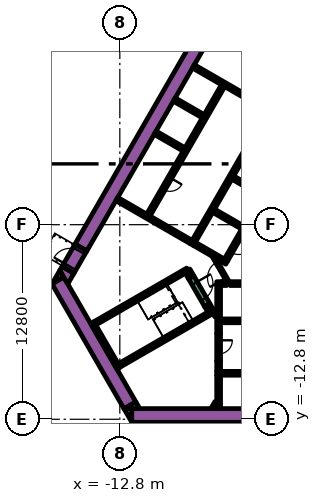
"""IFC4 building model, lengths in metres.
Left out: names, types, materials, properties, quantities, classifications, styles, units other than length and angle.
Written with IfcOpenShell. Run it as: python <this file> out.ifc"""

import sys

from ifc_helpers import new_model, si_unit, direction, frame, frame_2d, origin, origin_2d, place, context, subcontext, project, spatial, polyline, rectangle, outline, extrude, element, fill, save


model = new_model("IFC4")
c1 = context("Model", 3, precision=1e-05, world=origin(), true_north=direction((0.0, 1.0)))
c2 = subcontext(c1, "Body", "Model", "MODEL_VIEW")
j1 = project(units=[si_unit("LENGTHUNIT", "METRE"), si_unit("PLANEANGLEUNIT", "RADIAN")], contexts=[c1])
p1 = place(None, origin())
s1 = spatial("IfcSite", under=j1, at=p1, CompositionType="ELEMENT")
p2 = place(p1, origin())
s2 = spatial("IfcBuilding", under=s1, at=p2, CompositionType="ELEMENT")
p3 = place(p2, origin())
s3 = spatial("IfcBuildingStorey", under=s2, at=p3, CompositionType="ELEMENT", Elevation=0.0)
p4 = place(p3, frame((-19.355, 12.329, 2.1), z_axis=(0.200269190983, 0.336813845705, 0.920026458578), x_axis=(-0.859534207637, 0.511078218966, 0.0)))
e1 = element("IfcColumn", 1, at=p4, inside=s3, PredefinedType="COLUMN", context=c2, shape_type="SweptSolid", body=[
    extrude(rectangle(XDim=1.8, YDim=1.6, at=origin_2d()), origin(), (0.0, 0.0, 1.0), 17.608),
])
p5 = place(p2, frame((0.0, 0.0, 16.2)))
s4 = spatial("IfcBuildingStorey", under=s2, at=p5, CompositionType="ELEMENT", Elevation=16.2)
p6 = place(p5, frame((-15.36, -1.503, 0.0), z_axis=(0.0, 0.0, 1.0), x_axis=(0.50000389221, 0.866023156604, 0.0)))
e2 = element("IfcWall", 2, at=p6, inside=s4, PredefinedType="SOLIDWALL", context=c2, shape_type="SweptSolid", body=[
    extrude(rectangle(XDim=21.0, YDim=0.9, at=frame_2d((10.5, 0.0))), origin(), (0.0, 0.0, 1.0), 5.4),
])
p7 = place(p5, frame((-12.019, -12.55, 0.0), z_axis=(0.0, 0.0, 1.0), x_axis=(1.0, 0.0, 0.0)))
e3 = element("IfcWall", 3, at=p7, inside=s4, PredefinedType="SOLIDWALL", context=c2, shape_type="SweptSolid", body=[
    extrude(rectangle(XDim=21.63, YDim=0.9, at=frame_2d((10.815, 0.0))), origin(), (0.0, 0.0, 1.0), 5.4),
])
p8 = place(p5, origin())
e4 = element("IfcWall", 4, at=p8, inside=s4, PredefinedType="SOLIDWALL", context=c2, shape_type="SweptSolid", body=[
    extrude(outline(polyline([(-12.529, -12.1), (-12.021, -12.1), (-12.021, -12.98), (-12.529, -12.1)])), origin(), (0.0, 0.0, 1.0), 5.4),
])
p9 = place(p5, frame((-12.134, -11.883, 0.0), z_axis=(0.0, 0.0, 1.0), x_axis=(-0.500005339912, 0.866022320763, 0.0)))
e5 = element("IfcWall", 5, at=p9, inside=s4, PredefinedType="SOLIDWALL", context=c2, shape_type="SweptSolid", body=[
    extrude(rectangle(XDim=9.488, YDim=0.9, at=frame_2d((4.744, 0.0))), origin(), (0.0, 0.0, 1.0), 5.4),
])
e6 = element("IfcWall", 6, at=p8, inside=s4, PredefinedType="SOLIDWALL", context=c2, shape_type="SweptSolid", body=[
    extrude(outline(polyline([(-16.489, -3.44), (-17.251, -3.88), (-16.743, -3.0), (-16.489, -3.44)])), origin(), (0.0, 0.0, 1.0), 5.4),
])
e7 = element("IfcWall", 7, at=p8, inside=s4, PredefinedType="SOLIDWALL", context=c2, shape_type="SweptSolid", body=[
    extrude(outline(polyline([(-11.489, -12.1), (-12.505, -12.1), (-11.743, -11.66), (-11.489, -12.1)])), origin(), (0.0, 0.0, 1.0), 5.4),
])
e8 = element("IfcWall", 8, at=p8, inside=s4, PredefinedType="SOLIDWALL", context=c2, shape_type="SweptSolid", body=[
    extrude(outline(polyline([(-15.82, -3.201), (-16.223, -3.9), (-16.743, -3.0), (-16.599, -2.751), (-15.82, -3.201)])), origin(), (0.0, 0.0, 1.0), 5.4),
])
p10 = place(p5, frame((-12.885, -9.431, 0.0), z_axis=(0.0, 0.0, 1.0), x_axis=(-0.500020560727, 0.866013532718, 0.0)))
e9 = element("IfcWall", 9, at=p10, inside=s4, PredefinedType="SOLIDWALL", context=c2, shape_type="SweptSolid", body=[
    extrude(rectangle(XDim=3.45, YDim=0.25, at=frame_2d((1.725, 0.0))), origin(), (0.0, 0.0, 1.0), 5.4),
])
p11 = place(p5, frame((-14.44, -6.49, 0.0), z_axis=(0.0, 0.0, 1.0), x_axis=(0.866022966069, 0.500004222222, 0.0)))
e10 = element("IfcWall", 10, at=p11, inside=s4, PredefinedType="SOLIDWALL", context=c2, shape_type="SweptSolid", body=[
    extrude(rectangle(XDim=6.8, YDim=0.25, at=frame_2d((3.4, 0.0))), origin(), (0.0, 0.0, 1.0), 5.4),
])
p12 = place(p5, frame((-8.168, -3.503, 0.0), z_axis=(0.0, 0.0, 1.0), x_axis=(-0.499952099219, 0.866053057547, 0.0)))
e11 = element("IfcWall", 11, at=p12, inside=s4, PredefinedType="SOLIDWALL", context=c2, shape_type="SweptSolid", body=[
    extrude(rectangle(XDim=0.675, YDim=0.25, at=frame_2d((0.337, 0.0))), origin(), (0.0, 0.0, 1.0), 5.4),
])
p13 = place(p5, frame((-12.84, -9.261, 0.0), z_axis=(0.0, 0.0, 1.0), x_axis=(0.866016039709, 0.500016218704, 0.0)))
e12 = element("IfcWall", 12, at=p13, inside=s4, PredefinedType="SOLIDWALL", context=c2, shape_type="SweptSolid", body=[
    extrude(rectangle(XDim=7.05, YDim=0.25, at=frame_2d((3.525, 0.0))), origin(), (0.0, 0.0, 1.0), 5.4),
])
p14 = place(p5, frame((-6.905, -5.69, 0.0), z_axis=(0.0, 0.0, 1.0), x_axis=(-0.500402024738, 0.865793170242, 0.0)))
e13 = element("IfcWall", 13, at=p14, inside=s4, PredefinedType="SOLIDWALL", context=c2, shape_type="SweptSolid", body=[
    extrude(rectangle(XDim=0.425, YDim=0.25, at=frame_2d((0.212, 0.0))), origin(), (0.0, 0.0, 1.0), 5.4),
])
p15 = place(p5, frame((-6.425, -9.775, 0.0), z_axis=(0.0, 0.0, 1.0), x_axis=(1.0, 0.0, 0.0)))
e14 = element("IfcWall", 14, at=p15, inside=s4, PredefinedType="SOLIDWALL", context=c2, shape_type="SweptSolid", body=[
    extrude(rectangle(XDim=12.85, YDim=0.25, at=frame_2d((6.425, 0.0))), origin(), (0.0, 0.0, 1.0), 5.4),
])
p16 = place(p5, frame((-6.3, -9.9, 0.0), z_axis=(0.0, 0.0, 1.0), x_axis=(0.0, -1.0, 0.0)))
e15 = element("IfcWall", 15, at=p16, inside=s4, PredefinedType="SOLIDWALL", context=c2, shape_type="SweptSolid", body=[
    extrude(rectangle(XDim=2.2, YDim=0.25, at=frame_2d((1.1, 0.0))), origin(), (0.0, 0.0, 1.0), 5.4),
])
p17 = place(p5, frame((-6.3, -9.65, 0.0), z_axis=(0.0, 0.0, 1.0), x_axis=(0.0, 1.0, 0.0)))
e16 = element("IfcWall", 16, at=p17, inside=s4, PredefinedType="SOLIDWALL", context=c2, shape_type="SweptSolid", body=[
    extrude(rectangle(XDim=0.695, YDim=0.25, at=frame_2d((0.348, 0.0))), origin(), (0.0, 0.0, 1.0), 5.4),
])
p18 = place(p5, frame((-5.545, -3.875, 0.0), z_axis=(0.0, 0.0, 1.0), x_axis=(1.0, 0.0, 0.0)))
e17 = element("IfcWall", 17, at=p18, inside=s4, PredefinedType="SOLIDWALL", context=c2, shape_type="SweptSolid", body=[
    extrude(rectangle(XDim=11.97, YDim=0.25, at=frame_2d((5.985, 0.0))), origin(), (0.0, 0.0, 1.0), 5.4),
])
p19 = place(p5, frame((-6.425, -3.875, 0.0), z_axis=(0.0, 0.0, 1.0), x_axis=(1.0, 0.0, 0.0)))
e18 = element("IfcWall", 18, at=p19, inside=s4, PredefinedType="SOLIDWALL", context=c2, shape_type="SweptSolid", body=[
    extrude(rectangle(XDim=0.658, YDim=0.25, at=frame_2d((0.329, 0.0))), origin(), (0.0, 0.0, 1.0), 5.4),
])
p20 = place(p5, frame((-6.3, -4.0, 0.0), z_axis=(0.0, 0.0, 1.0), x_axis=(0.0, -1.0, 0.0)))
e19 = element("IfcWall", 19, at=p20, inside=s4, PredefinedType="SOLIDWALL", context=c2, shape_type="SweptSolid", body=[
    extrude(rectangle(XDim=3.154, YDim=0.25, at=frame_2d((1.577, 0.0))), origin(), (0.0, 0.0, 1.0), 5.4),
])
p21 = place(p5, frame((-8.06, -1.311, 0.0), z_axis=(0.0, 0.0, 1.0), x_axis=(0.50000273126, 0.866023826885, 0.0)))
e20 = element("IfcWall", 20, at=p21, inside=s4, PredefinedType="SOLIDWALL", context=c2, shape_type="SweptSolid", body=[
    extrude(rectangle(XDim=10.33, YDim=0.25, at=frame_2d((5.165, 0.0))), origin(), (0.0, 0.0, 1.0), 5.4),
])
for number, where, z_axis, x_axis in (
    (21, (-5.369, 3.1, 0.0), (0.0, 0.0, 1.0), (0.866, -0.5, 0.0)),
    (22, (-4.724, -0.182, 0.0), (0.0, 0.0, 1.0), (-0.866, 0.5, 0.0)),
):
    element("IfcWall", number, at=place(p5, frame(where, z_axis=z_axis, x_axis=x_axis)), inside=s4, PredefinedType="SOLIDWALL", context=c2, shape_type="SweptSolid", body=[
        extrude(rectangle(XDim=2.2, YDim=0.25, at=frame_2d((1.1, 0.0))), origin(), (0.0, 0.0, 1.0), 5.4),
    ])
e23 = element("IfcWall", 23, at=p8, inside=s4, PredefinedType="SOLIDWALL", context=c2, shape_type="SweptSolid", body=[
    extrude(outline(polyline([(-5.922, -2.257), (-5.922, -2.257), (-5.705, -2.382), (-5.83, -2.598), (-6.483, -2.221), (-6.591, -2.033), (-6.591, -2.033), (-6.7, -2.096), (-7.952, -1.373), (-7.827, -1.156), (-5.922, -2.257)])), origin(), (0.0, 0.0, 1.0), 5.4),
])
p22 = place(p5, frame((-8.106, -1.14, 0.0), z_axis=(0.0, 0.0, 1.0), x_axis=(-0.866000643155, 0.500042884217, 0.0)))
e24 = element("IfcWall", 24, at=p22, inside=s4, PredefinedType="SOLIDWALL", context=c2, shape_type="SweptSolid", body=[
    extrude(rectangle(XDim=5.65, YDim=0.25, at=frame_2d((2.825, 0.0))), origin(), (0.0, 0.0, 1.0), 5.4),
])
for number, where, z_axis, x_axis in (
    (25, (-8.574, 4.95, 0.0), (0.0, 0.0, 1.0), (-0.866, 0.5, 0.0)),
    (26, (-7.314, 7.132, 0.0), (0.0, 0.0, 1.0), (-0.866, 0.5, 0.0)),
):
    element("IfcWall", number, at=place(p5, frame(where, z_axis=z_axis, x_axis=x_axis)), inside=s4, PredefinedType="SOLIDWALL", context=c2, shape_type="SweptSolid", body=[
        extrude(rectangle(XDim=2.2, YDim=0.25, at=frame_2d((1.1, 0.0))), origin(), (0.0, 0.0, 1.0), 5.4),
    ])
p23 = place(p5, frame((-7.959, 10.415, 0.0), z_axis=(0.0, 0.0, 1.0), x_axis=(0.866020958405, -0.500007699544, 0.0)))
e27 = element("IfcWall", 27, at=p23, inside=s4, PredefinedType="SOLIDWALL", context=c2, shape_type="SweptSolid", body=[
    extrude(rectangle(XDim=4.1, YDim=0.25, at=frame_2d((2.05, 0.0))), origin(), (0.0, 0.0, 1.0), 5.4),
])
p24 = place(p5, frame((-6.708, -12.068, 0.0), z_axis=(0.0, 0.0, 1.0), x_axis=(0.500000789788, 0.8660249478, 0.0)))
e28 = element("IfcWall", 28, at=p24, inside=s4, PredefinedType="PARTITIONING", context=c2, shape_type="SweptSolid", body=[
    extrude(rectangle(XDim=0.456, YDim=0.15, at=frame_2d((0.228, 0.0))), origin(), (0.0, 0.0, 1.0), 4.1),
])
p25 = place(p5, frame((-6.534, -12.068, 0.0), z_axis=(0.0, 0.0, 1.0), x_axis=(0.500240224089, 0.865886665912, 0.0)))
e29 = element("IfcWall", 29, at=p25, inside=s4, PredefinedType="PARTITIONING", context=c2, shape_type="SweptSolid", body=[
    extrude(rectangle(XDim=0.109, YDim=0.15, at=frame_2d((0.054, 0.0))), origin(), (0.0, 0.0, 1.0), 4.1),
])
p26 = place(p5, frame((-6.48, -6.027, 0.0), z_axis=(0.0, 0.0, 1.0), x_axis=(-0.499927229454, 0.866067413802, 0.0)))
e30 = element("IfcWall", 30, at=p26, inside=s4, PredefinedType="PARTITIONING", context=c2, shape_type="SweptSolid", body=[
    extrude(rectangle(XDim=0.929, YDim=0.15, at=frame_2d((0.464, 0.0))), origin(), (0.0, 0.0, 1.0), 5.4),
])
p27 = place(p5, frame((-8.252, -2.958, 0.0), z_axis=(0.0, 0.0, 1.0), x_axis=(0.500174715838, -0.865924508047, 0.0)))
e31 = element("IfcWall", 31, at=p27, inside=s4, PredefinedType="PARTITIONING", context=c2, shape_type="SweptSolid", body=[
    extrude(rectangle(XDim=0.514, YDim=0.15, at=frame_2d((0.257, 0.0))), origin(), (0.0, 0.0, 1.0), 4.1),
])
p28 = place(p5, frame((-6.175, -6.325, 0.0), z_axis=(0.0, 0.0, 1.0), x_axis=(1.0, 0.0, 0.0)))
e32 = element("IfcWall", 32, at=p28, inside=s4, PredefinedType="SOLIDWALL", context=c2, shape_type="SweptSolid", body=[
    extrude(rectangle(XDim=12.35, YDim=0.25, at=frame_2d((6.175, 0.0))), origin(), (0.0, 0.0, 1.0), 5.4),
])
p29 = place(p28, frame((3.205, 0.0, 0.0)))
e33 = element("IfcOpeningElement", 33, at=p29, cuts=e32, PredefinedType="OPENING", context=c2, shape_type="SweptSolid", body=[
    extrude(rectangle(XDim=0.9, YDim=2.1, at=frame_2d((0.45, 1.05))), frame((0.0, 0.135, 0.0), z_axis=(0.0, -1.0, 0.0), x_axis=(1.0, 0.0, 0.0)), (0.0, 0.0, 1.0), 0.27),
])
p30 = place(p28, frame((8.145, 0.0, 0.0)))
e34 = element("IfcOpeningElement", 34, at=p30, cuts=e32, PredefinedType="OPENING", context=c2, shape_type="SweptSolid", body=[
    extrude(rectangle(XDim=1.1, YDim=2.1, at=frame_2d((0.55, 1.05))), frame((0.0, 0.135, 0.0), z_axis=(0.0, -1.0, 0.0), x_axis=(1.0, 0.0, 0.0)), (0.0, 0.0, 1.0), 0.27),
])
p31 = place(p28, frame((10.665, 0.0, 0.0)))
e35 = element("IfcOpeningElement", 35, at=p31, cuts=e32, PredefinedType="OPENING", context=c2, shape_type="SweptSolid", body=[
    extrude(rectangle(XDim=1.1, YDim=2.1, at=frame_2d((0.55, 1.05))), frame((0.0, 0.135, 0.0), z_axis=(0.0, -1.0, 0.0), x_axis=(1.0, 0.0, 0.0)), (0.0, 0.0, 1.0), 0.27),
])
p32 = place(p5, frame((-6.008, 9.144, 0.0), z_axis=(0.0, 0.0, 1.0), x_axis=(-0.500006956611, -0.866021387346, 0.0)))
e36 = element("IfcWall", 36, at=p32, inside=s4, PredefinedType="SOLIDWALL", context=c2, shape_type="SweptSolid", body=[
    extrude(rectangle(XDim=9.83, YDim=0.25, at=frame_2d((4.915, 0.0))), origin(), (0.0, 0.0, 1.0), 5.4),
])
p33 = place(p32, frame((6.985, 0.0, 0.0)))
e37 = element("IfcOpeningElement", 37, at=p33, cuts=e36, PredefinedType="OPENING", context=c2, shape_type="SweptSolid", body=[
    extrude(rectangle(XDim=0.9, YDim=2.1, at=frame_2d((0.45, 1.05))), frame((0.0, 0.135, 0.0), z_axis=(0.0, -1.0, 0.0), x_axis=(1.0, 0.0, 0.0)), (0.0, 0.0, 1.0), 0.27),
])
p34 = place(p5, frame((-0.898, 6.194, 0.0), z_axis=(0.0, 0.0, 1.0), x_axis=(-0.499996202215, -0.866027596426, 0.0)))
e38 = element("IfcWall", 38, at=p34, inside=s4, PredefinedType="SOLIDWALL", context=c2, shape_type="SweptSolid", body=[
    extrude(rectangle(XDim=9.83, YDim=0.25, at=frame_2d((4.915, 0.0))), origin(), (0.0, 0.0, 1.0), 5.4),
])
p35 = place(p34, frame((0.585, 0.0, 0.0)))
e39 = element("IfcOpeningElement", 39, at=p35, cuts=e38, PredefinedType="OPENING", context=c2, shape_type="SweptSolid", body=[
    extrude(rectangle(XDim=1.1, YDim=2.1, at=frame_2d((0.55, 1.05))), frame((0.0, 0.135, 0.0), z_axis=(0.0, -1.0, 0.0), x_axis=(1.0, 0.0, 0.0)), (0.0, 0.0, 1.0), 0.27),
])
p36 = place(p34, frame((3.105, 0.0, 0.0)))
e40 = element("IfcOpeningElement", 40, at=p36, cuts=e38, PredefinedType="OPENING", context=c2, shape_type="SweptSolid", body=[
    extrude(rectangle(XDim=1.1, YDim=2.1, at=frame_2d((0.55, 1.05))), frame((0.0, 0.135, 0.0), z_axis=(0.0, -1.0, 0.0), x_axis=(1.0, 0.0, 0.0)), (0.0, 0.0, 1.0), 0.27),
])
p37 = place(p34, frame((5.625, 0.0, 0.0)))
e41 = element("IfcOpeningElement", 41, at=p37, cuts=e38, PredefinedType="OPENING", context=c2, shape_type="SweptSolid", body=[
    extrude(rectangle(XDim=1.1, YDim=2.1, at=frame_2d((0.55, 1.05))), frame((0.0, 0.135, 0.0), z_axis=(0.0, -1.0, 0.0), x_axis=(1.0, 0.0, 0.0)), (0.0, 0.0, 1.0), 0.27),
])
p38 = place(p34, frame((8.145, 0.0, 0.0)))
e42 = element("IfcOpeningElement", 42, at=p38, cuts=e38, PredefinedType="OPENING", context=c2, shape_type="SweptSolid", body=[
    extrude(rectangle(XDim=1.1, YDim=2.1, at=frame_2d((0.55, 1.05))), frame((0.0, 0.135, 0.0), z_axis=(0.0, -1.0, 0.0), x_axis=(1.0, 0.0, 0.0)), (0.0, 0.0, 1.0), 0.27),
])
p39 = place(p5, frame((-8.103, -3.466, 0.0), z_axis=(0.0, 0.0, 1.0), x_axis=(0.500078061341, -0.865980330357, 0.0)))
e43 = element("IfcWall", 43, at=p39, inside=s4, PredefinedType="SOLIDWALL", context=c2, shape_type="SweptSolid", body=[
    extrude(rectangle(XDim=2.1, YDim=0.4, at=frame_2d((1.05, 0.0))), origin(), (0.0, 0.0, 1.0), 5.4),
])
p40 = place(p39, frame((0.45, 0.0, 0.0)))
e44 = element("IfcOpeningElement", 44, at=p40, cuts=e43, PredefinedType="OPENING", context=c2, shape_type="SweptSolid", body=[
    extrude(rectangle(XDim=1.2, YDim=2.1, at=frame_2d((0.6, 1.05))), frame((0.0, 0.21, 0.0), z_axis=(0.0, -1.0, 0.0), x_axis=(1.0, 0.0, 0.0)), (0.0, 0.0, 1.0), 0.42),
])
p41 = place(p5, frame((-6.3, -7.154, 0.0), z_axis=(0.0, 0.0, 1.0), x_axis=(0.0, -1.0, 0.0)))
e45 = element("IfcWall", 45, at=p41, inside=s4, PredefinedType="SOLIDWALL", context=c2, shape_type="SweptSolid", body=[
    extrude(rectangle(XDim=1.8, YDim=0.25, at=frame_2d((0.9, 0.0))), origin(), (0.0, 0.0, 1.0), 5.4),
])
p42 = place(p41, frame((0.45, 0.0, 0.0)))
e46 = element("IfcOpeningElement", 46, at=p42, cuts=e45, PredefinedType="OPENING", context=c2, shape_type="SweptSolid", body=[
    extrude(rectangle(XDim=0.9, YDim=2.1, at=frame_2d((0.45, 1.05))), frame((0.0, 0.135, 0.0), z_axis=(0.0, -1.0, 0.0), x_axis=(1.0, 0.0, 0.0)), (0.0, 0.0, 1.0), 0.27),
])
p43 = place(p5, frame((-5.606, -3.89, 0.0), z_axis=(0.0, 0.0, 1.0), x_axis=(-0.500027713859, 0.866009402589, 0.0)))
e47 = element("IfcWall", 47, at=p43, inside=s4, PredefinedType="PARTITIONING", context=c2, shape_type="SweptSolid", body=[
    extrude(rectangle(XDim=2.1, YDim=0.15, at=frame_2d((1.05, 0.0))), origin(), (0.0, 0.0, 1.0), 4.1),
])
p44 = place(p43, frame((0.45, 0.0, 0.0)))
e48 = element("IfcOpeningElement", 48, at=p44, cuts=e47, PredefinedType="OPENING", context=c2, shape_type="SweptSolid", body=[
    extrude(rectangle(XDim=1.2, YDim=2.1, at=frame_2d((0.6, 1.05))), frame((0.0, 0.085, 0.0), z_axis=(0.0, -1.0, 0.0), x_axis=(1.0, 0.0, 0.0)), (0.0, 0.0, 1.0), 0.17),
])
p45 = place(p5, frame((-16.209, -2.976, 0.0), z_axis=(0.0, 0.0, 1.0), x_axis=(0.499954529098, 0.86605165483, 0.0)))
e49 = element("IfcWall", 49, at=p45, inside=s4, PredefinedType="SOLIDWALL", context=c2, shape_type="SweptSolid", body=[
    extrude(rectangle(XDim=1.7, YDim=0.9, at=frame_2d((0.85, 0.0))), origin(), (0.0, 0.0, 1.0), 5.4),
])
p46 = place(p45, frame((0.25, 0.0, 0.0)))
e50 = element("IfcOpeningElement", 50, at=p46, cuts=e49, PredefinedType="OPENING", context=c2, shape_type="SweptSolid", body=[
    extrude(rectangle(XDim=1.2, YDim=2.1, at=frame_2d((0.6, 1.05))), frame((0.0, 0.46, 0.0), z_axis=(0.0, -1.0, 0.0), x_axis=(1.0, 0.0, 0.0)), (0.0, 0.0, 1.0), 0.92),
])
p47 = place(p5, frame((-6.875, 40.198, 0.0), z_axis=(0.0, 0.0, 1.0), x_axis=(-0.500000527961, -0.866025098966, 0.0)))
e51 = element("IfcWall", 51, at=p47, inside=s4, PredefinedType="SOLIDWALL", context=c2, shape_type="SweptSolid", body=[
    extrude(rectangle(XDim=62.75, YDim=0.25, at=frame_2d((31.375, 0.0))), origin(), (0.0, 0.0, 1.0), 5.0),
])
p48 = place(p33, origin())
e52 = element("IfcDoor", 52, at=p48, inside=s4, OperationType="SINGLE_SWING_LEFT", PredefinedType="DOOR", context=c2, shape_type="SweptSolid", body=[
    extrude(rectangle(XDim=0.9, YDim=2.1, at=frame_2d((0.45, 1.05))), frame((0.0, 0.025, 0.0), z_axis=(0.0, -1.0, 0.0), x_axis=(1.0, 0.0, 0.0)), (0.0, 0.0, 1.0), 0.05),
])
fill(e37, e52)
p49 = place(p38, origin())
e53 = element("IfcDoor", 53, at=p49, inside=s4, OperationType="DOUBLE_DOOR_SLIDING", PredefinedType="DOOR", context=c2, shape_type="SweptSolid", body=[
    extrude(rectangle(XDim=1.1, YDim=2.1, at=frame_2d((0.55, 1.05))), frame((0.0, 0.025, 0.0), z_axis=(0.0, -1.0, 0.0), x_axis=(1.0, 0.0, 0.0)), (0.0, 0.0, 1.0), 0.05),
])
fill(e42, e53)
p50 = place(p40, origin())
e54 = element("IfcDoor", 54, at=p50, inside=s4, OperationType="SINGLE_SWING_LEFT", PredefinedType="DOOR", context=c2, shape_type="SweptSolid", body=[
    extrude(rectangle(XDim=1.2, YDim=2.1, at=frame_2d((0.6, 1.05))), frame((0.0, 0.025, 0.0), z_axis=(0.0, -1.0, 0.0), x_axis=(1.0, 0.0, 0.0)), (0.0, 0.0, 1.0), 0.05),
])
fill(e44, e54)
p51 = place(p42, origin())
e55 = element("IfcDoor", 55, at=p51, inside=s4, OperationType="SINGLE_SWING_LEFT", PredefinedType="DOOR", context=c2, shape_type="SweptSolid", body=[
    extrude(rectangle(XDim=0.9, YDim=2.1, at=frame_2d((0.45, 1.05))), frame((0.0, 0.025, 0.0), z_axis=(0.0, -1.0, 0.0), x_axis=(1.0, 0.0, 0.0)), (0.0, 0.0, 1.0), 0.05),
])
fill(e46, e55)
p52 = place(p44, origin())
e56 = element("IfcDoor", 56, at=p52, inside=s4, OperationType="SINGLE_SWING_LEFT", PredefinedType="DOOR", context=c2, shape_type="SweptSolid", body=[
    extrude(rectangle(XDim=1.2, YDim=2.1, at=frame_2d((0.6, 1.05))), frame((0.0, 0.025, 0.0), z_axis=(0.0, -1.0, 0.0), x_axis=(1.0, 0.0, 0.0)), (0.0, 0.0, 1.0), 0.05),
])
fill(e48, e56)
p53 = place(p46, origin())
e57 = element("IfcDoor", 57, at=p53, inside=s4, OperationType="SINGLE_SWING_LEFT", PredefinedType="DOOR", context=c2, shape_type="SweptSolid", body=[
    extrude(rectangle(XDim=1.2, YDim=2.1, at=frame_2d((0.6, 1.05))), frame((0.0, 0.025, 0.0), z_axis=(0.0, -1.0, 0.0), x_axis=(1.0, 0.0, 0.0)), (0.0, 0.0, 1.0), 0.05),
])
fill(e50, e57)
save(model, sys.argv[1])
